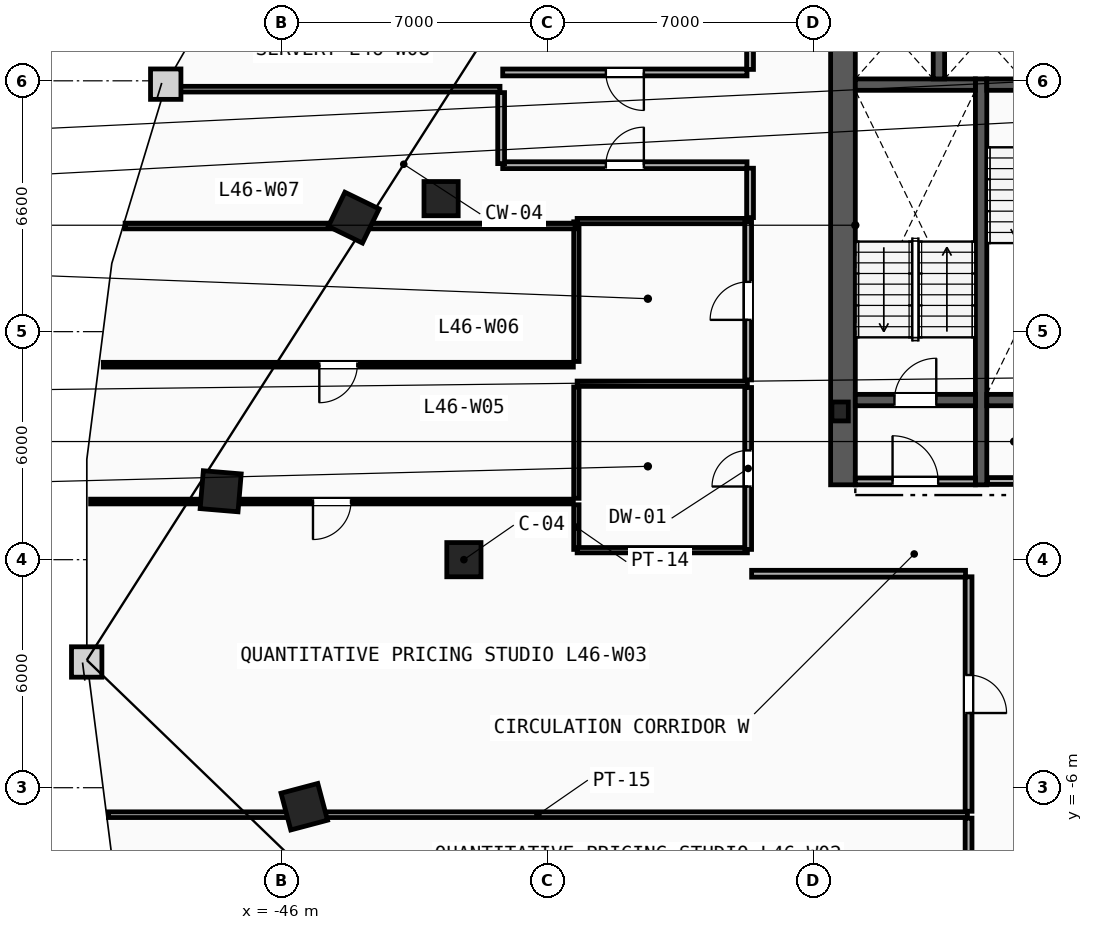
"""IFC4 building model, lengths in metres.
Left out: names, types, materials, properties, quantities, classifications, styles, units other than length and angle.
Written with IfcOpenShell. Run it as: python <this file> out.ifc"""

import sys

from ifc_helpers import new_model, si_unit, direction, frame, frame_2d, origin, origin_2d, place, context, subcontext, project, spatial, rectangle, i_section, extrude, element, fill, save


model = new_model("IFC4")
c1 = context("Model", 3, precision=1e-05, world=origin(), true_north=direction((0.0, 1.0)))
c2 = subcontext(c1, "Body", "Model", "MODEL_VIEW")
j1 = project(units=[si_unit("LENGTHUNIT", "METRE"), si_unit("PLANEANGLEUNIT", "RADIAN")], contexts=[c1])
p1 = place(None, origin())
s1 = spatial("IfcSite", under=j1, at=p1, CompositionType="ELEMENT")
p2 = place(p1, origin())
s2 = spatial("IfcBuilding", under=s1, at=p2, CompositionType="ELEMENT")
p3 = place(p2, frame((0.0, 0.0, 176.4)))
s3 = spatial("IfcBuildingStorey", under=s2, at=p3, CompositionType="ELEMENT", Elevation=176.4)
p4 = place(p3, frame((-31.3, 3.9, 0.0), z_axis=(0.0, 0.0, 1.0), x_axis=(1.0, 0.0, 0.0)))
e1 = element("IfcColumn", 1, at=p4, inside=s3, PredefinedType="COLUMN", context=c2, shape_type="SweptSolid", body=[
    extrude(i_section(OverallWidth=0.432, OverallDepth=0.498, WebThickness=0.056, FlangeThickness=0.089, FilletRadius=0.018, at=origin_2d()), origin(), (0.0, 0.0, 1.0), 3.6),
])
for number, where, z_axis, x_axis in (
    (2, (-41.2, 0.0, 0.0), (0.0, 0.0, 1.0), (1.0, 0.0, 0.0)),
    (3, (-41.8, 9.5, 0.0), (0.0, 0.0, 1.0), (1.0, 0.0, 0.0)),
):
    element("IfcColumn", number, at=place(p3, frame(where, z_axis=z_axis, x_axis=x_axis)), inside=s3, PredefinedType="COLUMN", context=c2, shape_type="SweptSolid", body=[
        extrude(rectangle(XDim=0.9, YDim=0.9, at=origin_2d()), origin(), (0.0, 0.0, 1.0), 3.6),
    ])
for number, where, z_axis, x_axis in (
    (4, (-44.1, 9.0, 0.0), (0.0, 0.0, 1.0), (-0.437, -0.899, 0.0)),
    (5, (-47.6, 1.8, 0.0), (0.0, 0.0, 1.0), (-0.084, -0.997, 0.0)),
    (6, (-45.4, -6.5, 0.0), (0.0, 0.0, 1.0), (0.256, -0.967, 0.0)),
):
    element("IfcColumn", number, at=place(p3, frame(where, z_axis=z_axis, x_axis=x_axis)), inside=s3, PredefinedType="COLUMN", context=c2, shape_type="SweptSolid", body=[
        extrude(rectangle(XDim=1.0, YDim=1.0, at=origin_2d()), origin(), (0.0, 0.0, 1.0), 3.6),
    ])
p5 = place(p3, frame((-31.225, 1.97, 0.0), z_axis=(0.0, 0.0, 1.0), x_axis=(0.0, 1.0, 0.0)))
e7 = element("IfcWall", 7, at=p5, inside=s3, PredefinedType="SHEAR", context=c2, shape_type="SweptSolid", body=[
    extrude(rectangle(XDim=13.33, YDim=0.65, at=frame_2d((6.665, 0.0))), origin(), (0.0, 0.0, 1.0), 3.36),
])
p6 = place(p3, frame((-27.59, 1.97, 0.0), z_axis=(0.0, 0.0, 1.0), x_axis=(0.0, 1.0, 0.0)))
e8 = element("IfcWall", 8, at=p6, inside=s3, PredefinedType="SHEAR", context=c2, shape_type="SweptSolid", body=[
    extrude(rectangle(XDim=10.68, YDim=0.3, at=frame_2d((5.34, 0.0))), origin(), (0.0, 0.0, 1.0), 3.36),
])
p7 = place(p3, frame((-30.9, 4.2, 0.0), z_axis=(0.0, 0.0, 1.0), x_axis=(1.0, 0.0, 0.0)))
e9 = element("IfcWall", 9, at=p7, inside=s3, PredefinedType="SHEAR", context=c2, shape_type="SweptSolid", body=[
    extrude(rectangle(XDim=3.16, YDim=0.3, at=frame_2d((1.58, 0.0))), origin(), (0.0, 0.0, 1.0), 3.36),
])
p8 = place(p7, frame((1.03, 0.0, 0.0)))
e10 = element("IfcOpeningElement", 10, at=p8, cuts=e9, PredefinedType="OPENING", context=c2, shape_type="SweptSolid", body=[
    extrude(rectangle(XDim=1.1, YDim=2.15, at=frame_2d((0.55, 1.075))), frame((0.0, 0.16, 0.0), z_axis=(0.0, -1.0, 0.0), x_axis=(1.0, 0.0, 0.0)), (0.0, 0.0, 1.0), 0.32),
])
p9 = place(p3, frame((-30.9, 12.5, 0.0), z_axis=(0.0, 0.0, 1.0), x_axis=(1.0, 0.0, 0.0)))
e11 = element("IfcWall", 11, at=p9, inside=s3, PredefinedType="SHEAR", context=c2, shape_type="SweptSolid", body=[
    extrude(rectangle(XDim=3.16, YDim=0.3, at=frame_2d((1.58, 0.0))), origin(), (0.0, 0.0, 1.0), 3.36),
])
p10 = place(p3, frame((-27.44, 12.5, 0.0), z_axis=(0.0, 0.0, 1.0), x_axis=(1.0, 0.0, 0.0)))
e12 = element("IfcWall", 12, at=p10, inside=s3, PredefinedType="SHEAR", context=c2, shape_type="SweptSolid", body=[
    extrude(rectangle(XDim=3.16, YDim=0.3, at=frame_2d((1.58, 0.0))), origin(), (0.0, 0.0, 1.0), 3.36),
])
p11 = place(p10, frame((1.03, 0.0, 0.0)))
e13 = element("IfcOpeningElement", 13, at=p11, cuts=e12, PredefinedType="OPENING", context=c2, shape_type="SweptSolid", body=[
    extrude(rectangle(XDim=1.1, YDim=2.15, at=frame_2d((0.55, 1.075))), frame((0.0, 0.16, 0.0), z_axis=(0.0, -1.0, 0.0), x_axis=(1.0, 0.0, 0.0)), (0.0, 0.0, 1.0), 0.32),
])
p12 = place(p3, frame((-27.44, 4.2, 0.0), z_axis=(0.0, 0.0, 1.0), x_axis=(1.0, 0.0, 0.0)))
e14 = element("IfcWall", 14, at=p12, inside=s3, PredefinedType="SHEAR", context=c2, shape_type="SweptSolid", body=[
    extrude(rectangle(XDim=3.16, YDim=0.3, at=frame_2d((1.58, 0.0))), origin(), (0.0, 0.0, 1.0), 3.36),
])
p13 = place(p3, frame((-30.9, 2.06, 0.0), z_axis=(0.0, 0.0, 1.0), x_axis=(1.0, 0.0, 0.0)))
e15 = element("IfcWall", 15, at=p13, inside=s3, PredefinedType="PARTITIONING", context=c2, shape_type="SweptSolid", body=[
    extrude(rectangle(XDim=3.16, YDim=0.18, at=frame_2d((1.58, 0.0))), origin(), (0.0, 0.0, 1.0), 3.36),
])
p14 = place(p13, frame((0.98, 0.0, 0.0)))
e16 = element("IfcOpeningElement", 16, at=p14, cuts=e15, PredefinedType="OPENING", context=c2, shape_type="SweptSolid", body=[
    extrude(rectangle(XDim=1.2, YDim=2.15, at=frame_2d((0.6, 1.075))), frame((0.0, 0.1, 0.0), z_axis=(0.0, -1.0, 0.0), x_axis=(1.0, 0.0, 0.0)), (0.0, 0.0, 1.0), 0.2),
])
p15 = place(p3, frame((-28.7, 12.65, 0.0), z_axis=(0.0, 0.0, 1.0), x_axis=(0.0, 1.0, 0.0)))
e17 = element("IfcWall", 17, at=p15, inside=s3, PredefinedType="SHEAR", context=c2, shape_type="SweptSolid", body=[
    extrude(rectangle(XDim=2.3, YDim=0.3, at=frame_2d((1.15, 0.0))), origin(), (0.0, 0.0, 1.0), 3.36),
])
p16 = place(p3, frame((-27.42, 2.07, 0.0), z_axis=(0.0, 0.0, 1.0), x_axis=(1.0, 0.0, 0.0)))
e18 = element("IfcWall", 18, at=p16, inside=s3, PredefinedType="PARTITIONING", context=c2, shape_type="SweptSolid", body=[
    extrude(rectangle(XDim=3.12, YDim=0.18, at=frame_2d((1.56, 0.0))), origin(), (0.0, 0.0, 1.0), 3.36),
])
p17 = place(p16, frame((1.085, 0.0, 0.0)))
e19 = element("IfcOpeningElement", 19, at=p17, cuts=e18, PredefinedType="OPENING", context=c2, shape_type="SweptSolid", body=[
    extrude(rectangle(XDim=0.95, YDim=2.1, at=frame_2d((0.475, 1.05))), frame((0.0, 0.1, 0.0), z_axis=(0.0, -1.0, 0.0), x_axis=(1.0, 0.0, 0.0)), (0.0, 0.0, 1.0), 0.2),
])
p18 = place(p3, frame((-38.24, 0.27, 0.0), z_axis=(0.0, 0.0, 1.0), x_axis=(0.0, 1.0, 0.0)))
e20 = element("IfcWall", 20, at=p18, inside=s3, PredefinedType="PARTITIONING", context=c2, shape_type="SweptSolid", body=[
    extrude(rectangle(XDim=1.175, YDim=0.14, at=frame_2d((0.587, 0.0))), origin(), (0.0, 0.0, 1.0), 3.36),
])
p19 = place(p3, frame((-38.24, 1.615, 0.0), z_axis=(0.0, 0.0, 1.0), x_axis=(0.0, 1.0, 0.0)))
e21 = element("IfcWall", 21, at=p19, inside=s3, PredefinedType="PARTITIONING", context=c2, shape_type="SweptSolid", body=[
    extrude(rectangle(XDim=2.93, YDim=0.14, at=frame_2d((1.465, 0.0))), origin(), (0.0, 0.0, 1.0), 3.36),
])
p20 = place(p3, frame((-38.24, 5.215, 0.0), z_axis=(0.0, 0.0, 1.0), x_axis=(0.0, 1.0, 0.0)))
e22 = element("IfcWall", 22, at=p20, inside=s3, PredefinedType="PARTITIONING", context=c2, shape_type="SweptSolid", body=[
    extrude(rectangle(XDim=3.675, YDim=0.14, at=frame_2d((1.837, 0.0))), origin(), (0.0, 0.0, 1.0), 3.36),
])
for number, where, z_axis, x_axis in (
    (23, (-38.22, 0.25, 0.0), (0.0, 0.0, 1.0), (1.0, 0.0, 0.0)),
    (24, (-38.22, 4.63, 0.0), (0.0, 0.0, 1.0), (1.0, 0.0, 0.0)),
    (25, (-38.22, 8.91, 0.0), (0.0, 0.0, 1.0), (1.0, 0.0, 0.0)),
):
    element("IfcWall", number, at=place(p3, frame(where, z_axis=z_axis, x_axis=x_axis)), inside=s3, PredefinedType="PARTITIONING", context=c2, shape_type="SweptSolid", body=[
        extrude(rectangle(XDim=4.48, YDim=0.14, at=frame_2d((2.24, 0.0))), origin(), (0.0, 0.0, 1.0), 3.36),
    ])
p21 = place(p3, frame((-33.72, 0.27, 0.0), z_axis=(0.0, 0.0, 1.0), x_axis=(0.0, 1.0, 0.0)))
e26 = element("IfcWall", 26, at=p21, inside=s3, PredefinedType="PARTITIONING", context=c2, shape_type="SweptSolid", body=[
    extrude(rectangle(XDim=4.26, YDim=0.18, at=frame_2d((2.13, 0.0))), origin(), (0.0, 0.0, 1.0), 3.36),
])
p22 = place(p21, frame((1.655, 0.0, 0.0)))
e27 = element("IfcOpeningElement", 27, at=p22, cuts=e26, PredefinedType="OPENING", context=c2, shape_type="SweptSolid", body=[
    extrude(rectangle(XDim=0.95, YDim=2.1, at=frame_2d((0.475, 1.05))), frame((0.0, 0.1, 0.0), z_axis=(0.0, -1.0, 0.0), x_axis=(1.0, 0.0, 0.0)), (0.0, 0.0, 1.0), 0.2),
])
p23 = place(p3, frame((-33.72, 4.73, 0.0), z_axis=(0.0, 0.0, 1.0), x_axis=(0.0, 1.0, 0.0)))
e28 = element("IfcWall", 28, at=p23, inside=s3, PredefinedType="PARTITIONING", context=c2, shape_type="SweptSolid", body=[
    extrude(rectangle(XDim=4.16, YDim=0.18, at=frame_2d((2.08, 0.0))), origin(), (0.0, 0.0, 1.0), 3.36),
])
p24 = place(p23, frame((1.58, 0.0, 0.0)))
e29 = element("IfcOpeningElement", 29, at=p24, cuts=e28, PredefinedType="OPENING", context=c2, shape_type="SweptSolid", body=[
    extrude(rectangle(XDim=1.0, YDim=2.15, at=frame_2d((0.5, 1.075))), frame((0.0, 0.1, 0.0), z_axis=(0.0, -1.0, 0.0), x_axis=(1.0, 0.0, 0.0)), (0.0, 0.0, 1.0), 0.2),
])
p25 = place(p3, frame((-50.553, -6.71, 0.0), z_axis=(0.0, 0.0, 1.0), x_axis=(1.0, 0.0, 0.0)))
e30 = element("IfcWall", 30, at=p25, inside=s3, PredefinedType="PARTITIONING", context=c2, shape_type="SweptSolid", body=[
    extrude(rectangle(XDim=22.603, YDim=0.15, at=frame_2d((11.302, 0.0))), origin(), (0.0, 0.0, 1.0), 3.36),
])
p26 = place(p3, frame((-50.115, 8.78, 0.0), z_axis=(0.0, 0.0, 1.0), x_axis=(1.0, 0.0, 0.0)))
e31 = element("IfcWall", 31, at=p26, inside=s3, PredefinedType="PARTITIONING", context=c2, shape_type="SweptSolid", body=[
    extrude(rectangle(XDim=11.845, YDim=0.15, at=frame_2d((5.922, 0.0))), origin(), (0.0, 0.0, 1.0), 3.36),
])
p27 = place(p3, frame((-49.024, 12.38, 0.0), z_axis=(0.0, 0.0, 1.0), x_axis=(1.0, 0.0, 0.0)))
e32 = element("IfcWall", 32, at=p27, inside=s3, PredefinedType="PARTITIONING", context=c2, shape_type="SweptSolid", body=[
    extrude(rectangle(XDim=8.774, YDim=0.15, at=frame_2d((4.387, 0.0))), origin(), (0.0, 0.0, 1.0), 3.36),
])
p28 = place(p3, frame((-27.92, -6.8, 0.0), z_axis=(0.0, 0.0, 1.0), x_axis=(0.0, -1.0, 0.0)))
e33 = element("IfcWall", 33, at=p28, inside=s3, PredefinedType="PARTITIONING", context=c2, shape_type="SweptSolid", body=[
    extrude(rectangle(XDim=4.378, YDim=0.18, at=frame_2d((2.189, 0.0))), origin(), (0.0, 0.0, 1.0), 3.36),
])
p29 = place(p28, frame((1.689, 0.0, 0.0)))
e34 = element("IfcOpeningElement", 34, at=p29, cuts=e33, PredefinedType="OPENING", context=c2, shape_type="SweptSolid", body=[
    extrude(rectangle(XDim=1.0, YDim=2.15, at=frame_2d((0.5, 1.075))), frame((0.0, 0.1, 0.0), z_axis=(0.0, -1.0, 0.0), x_axis=(1.0, 0.0, 0.0)), (0.0, 0.0, 1.0), 0.2),
])
p30 = place(p3, frame((-27.92, -0.45, 0.0), z_axis=(0.0, 0.0, 1.0), x_axis=(0.0, -1.0, 0.0)))
e35 = element("IfcWall", 35, at=p30, inside=s3, PredefinedType="PARTITIONING", context=c2, shape_type="SweptSolid", body=[
    extrude(rectangle(XDim=6.17, YDim=0.18, at=frame_2d((3.085, 0.0))), origin(), (0.0, 0.0, 1.0), 3.36),
])
p31 = place(p30, frame((2.585, 0.0, 0.0)))
e36 = element("IfcOpeningElement", 36, at=p31, cuts=e35, PredefinedType="OPENING", context=c2, shape_type="SweptSolid", body=[
    extrude(rectangle(XDim=1.0, YDim=2.15, at=frame_2d((0.5, 1.075))), frame((0.0, 0.1, 0.0), z_axis=(0.0, -1.0, 0.0), x_axis=(1.0, 0.0, 0.0)), (0.0, 0.0, 1.0), 0.2),
])
p32 = place(p3, frame((-33.628, -0.37, 0.0), z_axis=(0.0, 0.0, 1.0), x_axis=(1.0, 0.0, 0.0)))
e37 = element("IfcWall", 37, at=p32, inside=s3, PredefinedType="PARTITIONING", context=c2, shape_type="SweptSolid", body=[
    extrude(rectangle(XDim=5.628, YDim=0.18, at=frame_2d((2.814, 0.0))), origin(), (0.0, 0.0, 1.0), 3.36),
])
p33 = place(p3, frame((-40.178, 10.38, 0.0), z_axis=(0.0, 0.0, 1.0), x_axis=(1.0, 0.0, 0.0)))
e38 = element("IfcWall", 38, at=p33, inside=s3, PredefinedType="PARTITIONING", context=c2, shape_type="SweptSolid", body=[
    extrude(rectangle(XDim=6.428, YDim=0.18, at=frame_2d((3.214, 0.0))), origin(), (0.0, 0.0, 1.0), 3.36),
])
p34 = place(p33, frame((2.714, 0.0, 0.0)))
e39 = element("IfcOpeningElement", 39, at=p34, cuts=e38, PredefinedType="OPENING", context=c2, shape_type="SweptSolid", body=[
    extrude(rectangle(XDim=1.0, YDim=2.15, at=frame_2d((0.5, 1.075))), frame((0.0, 0.1, 0.0), z_axis=(0.0, -1.0, 0.0), x_axis=(1.0, 0.0, 0.0)), (0.0, 0.0, 1.0), 0.2),
])
p35 = place(p3, frame((-40.22, 12.29, 0.0), z_axis=(0.0, 0.0, 1.0), x_axis=(0.0, -1.0, 0.0)))
e40 = element("IfcWall", 40, at=p35, inside=s3, PredefinedType="PARTITIONING", context=c2, shape_type="SweptSolid", body=[
    extrude(rectangle(XDim=1.869, YDim=0.18, at=frame_2d((0.934, 0.0))), origin(), (0.0, 0.0, 1.0), 3.36),
])
p36 = place(p3, frame((-33.67, 10.3, 0.0), z_axis=(0.0, 0.0, 1.0), x_axis=(0.0, -1.0, 0.0)))
e41 = element("IfcWall", 41, at=p36, inside=s3, PredefinedType="PARTITIONING", context=c2, shape_type="SweptSolid", body=[
    extrude(rectangle(XDim=1.299, YDim=0.18, at=frame_2d((0.649, 0.0))), origin(), (0.0, 0.0, 1.0), 3.36),
])
p37 = place(p3, frame((-33.75, 12.82, 0.0), z_axis=(0.0, 0.0, 1.0), x_axis=(-1.0, 0.0, 0.0)))
e42 = element("IfcWall", 42, at=p37, inside=s3, PredefinedType="PARTITIONING", context=c2, shape_type="SweptSolid", body=[
    extrude(rectangle(XDim=6.428, YDim=0.18, at=frame_2d((3.214, 0.0))), origin(), (0.0, 0.0, 1.0), 3.36),
])
p38 = place(p37, frame((2.714, 0.0, 0.0)))
e43 = element("IfcOpeningElement", 43, at=p38, cuts=e42, PredefinedType="OPENING", context=c2, shape_type="SweptSolid", body=[
    extrude(rectangle(XDim=1.0, YDim=2.15, at=frame_2d((0.5, 1.075))), frame((0.0, 0.1, 0.0), z_axis=(0.0, -1.0, 0.0), x_axis=(1.0, 0.0, 0.0)), (0.0, 0.0, 1.0), 0.2),
])
p39 = place(p3, frame((-33.67, 17.428, 0.0), z_axis=(0.0, 0.0, 1.0), x_axis=(0.0, -1.0, 0.0)))
e44 = element("IfcWall", 44, at=p39, inside=s3, PredefinedType="PARTITIONING", context=c2, shape_type="SweptSolid", body=[
    extrude(rectangle(XDim=4.529, YDim=0.18, at=frame_2d((2.264, 0.0))), origin(), (0.0, 0.0, 1.0), 3.36),
])
p40 = place(p3, frame((-38.32, 1.53, 0.0), z_axis=(0.0, 0.0, 1.0), x_axis=(-1.0, 0.0, 0.0)))
e45 = element("IfcWall", 45, at=p40, inside=s3, PredefinedType="PARTITIONING", context=c2, shape_type="SweptSolid", body=[
    extrude(rectangle(XDim=12.702, YDim=0.125, at=frame_2d((6.351, 0.0))), origin(), (0.0, 0.0, 1.0), 3.36),
])
p41 = place(p40, frame((5.851, 0.0, 0.0)))
e46 = element("IfcOpeningElement", 46, at=p41, cuts=e45, PredefinedType="OPENING", context=c2, shape_type="SweptSolid", body=[
    extrude(rectangle(XDim=1.0, YDim=2.15, at=frame_2d((0.5, 1.075))), frame((0.0, 0.073, 0.0), z_axis=(0.0, -1.0, 0.0), x_axis=(1.0, 0.0, 0.0)), (0.0, 0.0, 1.0), 0.145),
])
p42 = place(p3, frame((-38.32, 5.13, 0.0), z_axis=(0.0, 0.0, 1.0), x_axis=(-1.0, 0.0, 0.0)))
e47 = element("IfcWall", 47, at=p42, inside=s3, PredefinedType="PARTITIONING", context=c2, shape_type="SweptSolid", body=[
    extrude(rectangle(XDim=12.369, YDim=0.125, at=frame_2d((6.184, 0.0))), origin(), (0.0, 0.0, 1.0), 3.36),
])
p43 = place(p42, frame((5.684, 0.0, 0.0)))
e48 = element("IfcOpeningElement", 48, at=p43, cuts=e47, PredefinedType="OPENING", context=c2, shape_type="SweptSolid", body=[
    extrude(rectangle(XDim=1.0, YDim=2.15, at=frame_2d((0.5, 1.075))), frame((0.0, 0.073, 0.0), z_axis=(0.0, -1.0, 0.0), x_axis=(1.0, 0.0, 0.0)), (0.0, 0.0, 1.0), 0.145),
])
p44 = place(p8, origin())
e49 = element("IfcDoor", 49, at=p44, inside=s3, OperationType="SINGLE_SWING_RIGHT", PredefinedType="DOOR", context=c2, shape_type="SweptSolid", body=[
    extrude(rectangle(XDim=1.1, YDim=2.15, at=frame_2d((0.55, 1.075))), frame((0.0, 0.025, 0.0), z_axis=(0.0, -1.0, 0.0), x_axis=(1.0, 0.0, 0.0)), (0.0, 0.0, 1.0), 0.05),
])
fill(e10, e49)
p45 = place(p14, origin())
e50 = element("IfcDoor", 50, at=p45, inside=s3, OperationType="SINGLE_SWING_LEFT", PredefinedType="DOOR", context=c2, shape_type="SweptSolid", body=[
    extrude(rectangle(XDim=1.2, YDim=2.15, at=frame_2d((0.6, 1.075))), frame((0.0, 0.025, 0.0), z_axis=(0.0, -1.0, 0.0), x_axis=(1.0, 0.0, 0.0)), (0.0, 0.0, 1.0), 0.05),
])
fill(e16, e50)
p46 = place(p41, origin())
e51 = element("IfcDoor", 51, at=p46, inside=s3, OperationType="SINGLE_SWING_RIGHT", PredefinedType="DOOR", context=c2, shape_type="SweptSolid", body=[
    extrude(rectangle(XDim=1.0, YDim=2.15, at=frame_2d((0.5, 1.075))), frame((0.0, 0.025, 0.0), z_axis=(0.0, -1.0, 0.0), x_axis=(1.0, 0.0, 0.0)), (0.0, 0.0, 1.0), 0.05),
])
fill(e46, e51)
p47 = place(p43, origin())
e52 = element("IfcDoor", 52, at=p47, inside=s3, OperationType="SINGLE_SWING_RIGHT", PredefinedType="DOOR", context=c2, shape_type="SweptSolid", body=[
    extrude(rectangle(XDim=1.0, YDim=2.15, at=frame_2d((0.5, 1.075))), frame((0.0, 0.025, 0.0), z_axis=(0.0, -1.0, 0.0), x_axis=(1.0, 0.0, 0.0)), (0.0, 0.0, 1.0), 0.05),
])
fill(e48, e52)
p48 = place(p34, origin())
e53 = element("IfcDoor", 53, at=p48, inside=s3, OperationType="SINGLE_SWING_RIGHT", PredefinedType="DOOR", context=c2, shape_type="SweptSolid", body=[
    extrude(rectangle(XDim=1.0, YDim=2.15, at=frame_2d((0.5, 1.075))), frame((0.0, 0.025, 0.0), z_axis=(0.0, -1.0, 0.0), x_axis=(1.0, 0.0, 0.0)), (0.0, 0.0, 1.0), 0.05),
])
fill(e39, e53)
p49 = place(p38, origin())
e54 = element("IfcDoor", 54, at=p49, inside=s3, OperationType="SINGLE_SWING_LEFT", PredefinedType="DOOR", context=c2, shape_type="SweptSolid", body=[
    extrude(rectangle(XDim=1.0, YDim=2.15, at=frame_2d((0.5, 1.075))), frame((0.0, 0.025, 0.0), z_axis=(0.0, -1.0, 0.0), x_axis=(1.0, 0.0, 0.0)), (0.0, 0.0, 1.0), 0.05),
])
fill(e43, e54)
p50 = place(p31, origin())
e55 = element("IfcDoor", 55, at=p50, inside=s3, OperationType="SINGLE_SWING_RIGHT", PredefinedType="DOOR", context=c2, shape_type="SweptSolid", body=[
    extrude(rectangle(XDim=1.0, YDim=2.15, at=frame_2d((0.5, 1.075))), frame((0.0, 0.025, 0.0), z_axis=(0.0, -1.0, 0.0), x_axis=(1.0, 0.0, 0.0)), (0.0, 0.0, 1.0), 0.05),
])
fill(e36, e55)
p51 = place(p22, origin())
e56 = element("IfcDoor", 56, at=p51, inside=s3, OperationType="SINGLE_SWING_LEFT", PredefinedType="DOOR", context=c2, shape_type="SweptSolid", body=[
    extrude(rectangle(XDim=0.95, YDim=2.1, at=frame_2d((0.475, 1.05))), frame((0.0, 0.025, 0.0), z_axis=(0.0, -1.0, 0.0), x_axis=(1.0, 0.0, 0.0)), (0.0, 0.0, 1.0), 0.05),
])
fill(e27, e56)
p52 = place(p24, origin())
e57 = element("IfcDoor", 57, at=p52, inside=s3, OperationType="SINGLE_SWING_LEFT", PredefinedType="DOOR", context=c2, shape_type="SweptSolid", body=[
    extrude(rectangle(XDim=1.0, YDim=2.15, at=frame_2d((0.5, 1.075))), frame((0.0, 0.025, 0.0), z_axis=(0.0, -1.0, 0.0), x_axis=(1.0, 0.0, 0.0)), (0.0, 0.0, 1.0), 0.05),
])
fill(e29, e57)
save(model, sys.argv[1])
